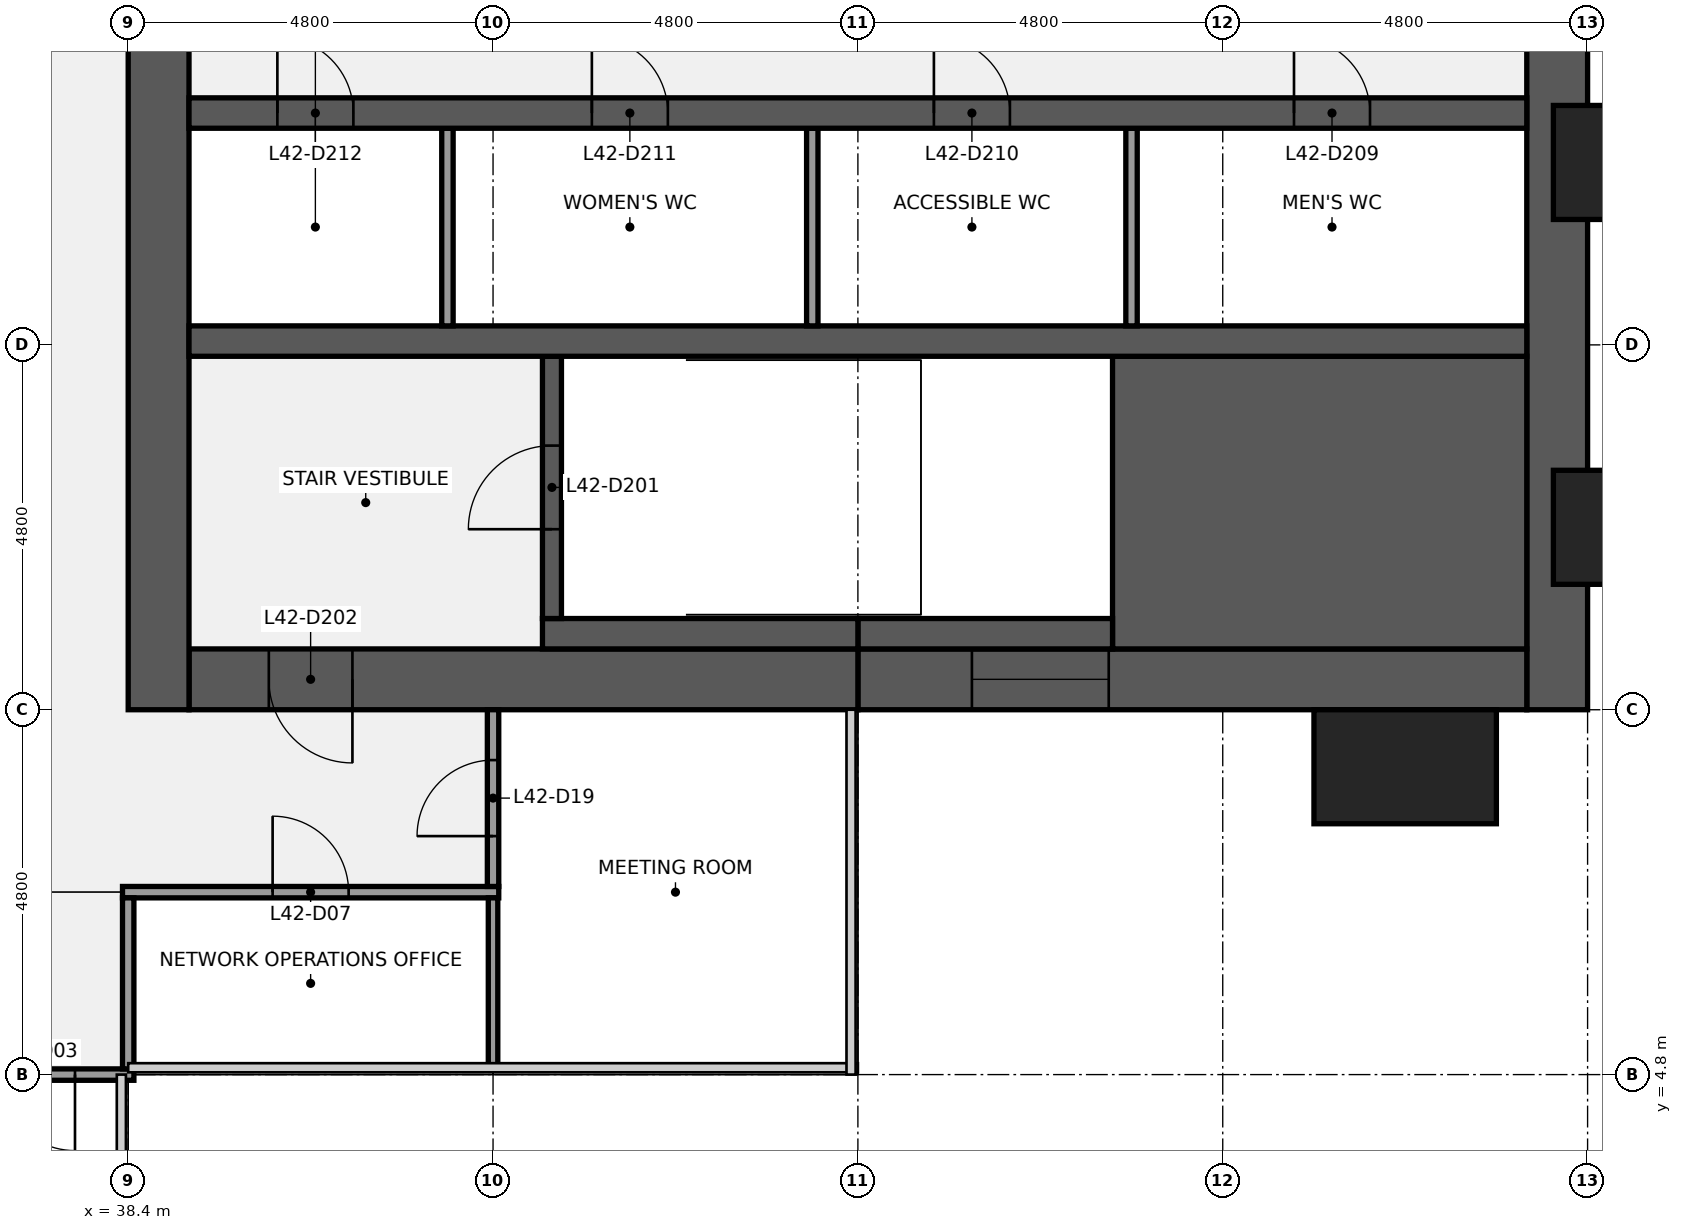
"""IFC4 building model, lengths in metres.
Left out: names, types, materials, properties, quantities, classifications, styles, units other than length and angle.
Written with IfcOpenShell. Run it as: python <this file> out.ifc"""

import sys

from ifc_helpers import new_model, si_unit, direction, frame, frame_2d, origin, origin_2d, place, context, subcontext, project, spatial, rectangle, extrude, element, fill, save


model = new_model("IFC4")
c1 = context("Model", 3, precision=1e-05, world=origin(), true_north=direction((0.0, 1.0)))
c2 = subcontext(c1, "Body", "Model", "MODEL_VIEW")
j1 = project(units=[si_unit("LENGTHUNIT", "METRE"), si_unit("PLANEANGLEUNIT", "RADIAN")], contexts=[c1])
p1 = place(None, origin())
s1 = spatial("IfcSite", under=j1, at=p1, CompositionType="ELEMENT")
p2 = place(p1, origin())
s2 = spatial("IfcBuilding", under=s1, at=p2, CompositionType="ELEMENT")
p3 = place(p2, frame((0.0, 0.0, 197.2)))
s3 = spatial("IfcBuildingStorey", under=s2, at=p3, CompositionType="ELEMENT", Elevation=197.2)
p4 = place(p3, frame((57.2, 38.4, 0.0), z_axis=(0.0, 0.0, 1.0), x_axis=(0.0, -1.0, 0.0)))
e1 = element("IfcWall", 1, at=p4, inside=s3, PredefinedType="SHEAR", context=c2, shape_type="SweptSolid", body=[
    extrude(rectangle(XDim=28.8, YDim=0.8, at=frame_2d((14.4, 0.0))), origin(), (0.0, 0.0, 1.0), 3.84),
])
p5 = place(p4, frame((18.45, 0.0, 0.9)))
e2 = element("IfcOpeningElement", 2, at=p5, cuts=e1, PredefinedType="OPENING", context=c2, shape_type="SweptSolid", body=[
    extrude(rectangle(XDim=1.5, YDim=1.5, at=frame_2d((0.75, 0.75))), frame((0.0, 0.41, 0.0), z_axis=(0.0, -1.0, 0.0), x_axis=(1.0, 0.0, 0.0)), (0.0, 0.0, 1.0), 0.82),
])
p6 = place(p4, frame((8.85, 0.0, 0.9)))
e3 = element("IfcOpeningElement", 3, at=p6, cuts=e1, PredefinedType="OPENING", context=c2, shape_type="SweptSolid", body=[
    extrude(rectangle(XDim=1.5, YDim=1.5, at=frame_2d((0.75, 0.75))), frame((0.0, 0.41, 0.0), z_axis=(0.0, -1.0, 0.0), x_axis=(1.0, 0.0, 0.0)), (0.0, 0.0, 1.0), 0.82),
])
p7 = place(p3, frame((56.8, 10.0, 0.0), z_axis=(0.0, 0.0, 1.0), x_axis=(-1.0, 0.0, 0.0)))
e4 = element("IfcWall", 4, at=p7, inside=s3, PredefinedType="SHEAR", context=c2, shape_type="SweptSolid", body=[
    extrude(rectangle(XDim=8.8, YDim=0.8, at=frame_2d((4.4, 0.0))), origin(), (0.0, 0.0, 1.0), 3.84),
])
p8 = place(p7, frame((5.5, 0.0, 0.9)))
e5 = element("IfcOpeningElement", 5, at=p8, cuts=e4, PredefinedType="OPENING", context=c2, shape_type="SweptSolid", body=[
    extrude(rectangle(XDim=1.8, YDim=1.5, at=frame_2d((0.9, 0.75))), frame((0.0, 0.41, 0.0), z_axis=(0.0, -1.0, 0.0), x_axis=(1.0, 0.0, 0.0)), (0.0, 0.0, 1.0), 0.82),
])
p9 = place(p3, frame((48.0, 10.0, 0.0), z_axis=(0.0, 0.0, 1.0), x_axis=(-1.0, 0.0, 0.0)))
e6 = element("IfcWall", 6, at=p9, inside=s3, PredefinedType="SHEAR", context=c2, shape_type="SweptSolid", body=[
    extrude(rectangle(XDim=8.8, YDim=0.8, at=frame_2d((4.4, 0.0))), origin(), (0.0, 0.0, 1.0), 3.84),
])
p10 = place(p9, frame((6.65, 0.0, 0.0)))
e7 = element("IfcOpeningElement", 7, at=p10, cuts=e6, PredefinedType="OPENING", context=c2, shape_type="SweptSolid", body=[
    extrude(rectangle(XDim=1.1, YDim=2.1, at=frame_2d((0.55, 1.05))), frame((0.0, 0.41, 0.0), z_axis=(0.0, -1.0, 0.0), x_axis=(1.0, 0.0, 0.0)), (0.0, 0.0, 1.0), 0.82),
])
p11 = place(p3, frame((38.8, 9.6, 0.0), z_axis=(0.0, 0.0, 1.0), x_axis=(0.0, 1.0, 0.0)))
e8 = element("IfcWall", 8, at=p11, inside=s3, PredefinedType="SHEAR", context=c2, shape_type="SweptSolid", body=[
    extrude(rectangle(XDim=28.8, YDim=0.8, at=frame_2d((14.4, 0.0))), origin(), (0.0, 0.0, 1.0), 3.84),
])
p12 = place(p11, frame((8.7, 0.0, 0.0)))
e9 = element("IfcOpeningElement", 9, at=p12, cuts=e8, PredefinedType="OPENING", context=c2, shape_type="SweptSolid", body=[
    extrude(rectangle(XDim=1.8, YDim=2.1, at=frame_2d((0.9, 1.05))), frame((0.0, 0.41, 0.0), z_axis=(0.0, -1.0, 0.0), x_axis=(1.0, 0.0, 0.0)), (0.0, 0.0, 1.0), 0.82),
])
p13 = place(p11, frame((18.3, 0.0, 0.0)))
e10 = element("IfcOpeningElement", 10, at=p13, cuts=e8, PredefinedType="OPENING", context=c2, shape_type="SweptSolid", body=[
    extrude(rectangle(XDim=1.8, YDim=2.1, at=frame_2d((0.9, 1.05))), frame((0.0, 0.41, 0.0), z_axis=(0.0, -1.0, 0.0), x_axis=(1.0, 0.0, 0.0)), (0.0, 0.0, 1.0), 0.82),
])
p14 = place(p3, frame((51.35, 12.325, 0.0), z_axis=(0.0, 0.0, 1.0), x_axis=(1.0, 0.0, 0.0)))
e11 = element("IfcWall", 11, at=p14, inside=s3, PredefinedType="SHEAR", context=c2, shape_type="SweptSolid", body=[
    extrude(rectangle(XDim=5.45, YDim=3.85, at=frame_2d((2.725, 0.0))), origin(), (0.0, 0.0, 1.0), 3.84),
])
p15 = place(p3, frame((48.0, 10.6, 0.0), z_axis=(0.0, 0.0, 1.0), x_axis=(1.0, 0.0, 0.0)))
e12 = element("IfcWall", 12, at=p15, inside=s3, PredefinedType="SHEAR", context=c2, shape_type="SweptSolid", body=[
    extrude(rectangle(XDim=3.35, YDim=0.4, at=frame_2d((1.675, 0.0))), origin(), (0.0, 0.0, 1.0), 3.84),
])
p16 = place(p3, frame((43.85, 10.6, 0.0), z_axis=(0.0, 0.0, 1.0), x_axis=(1.0, 0.0, 0.0)))
e13 = element("IfcWall", 13, at=p16, inside=s3, PredefinedType="SHEAR", context=c2, shape_type="SweptSolid", body=[
    extrude(rectangle(XDim=4.15, YDim=0.4, at=frame_2d((2.075, 0.0))), origin(), (0.0, 0.0, 1.0), 3.84),
])
p17 = place(p3, frame((43.975, 10.8, 0.0), z_axis=(0.0, 0.0, 1.0), x_axis=(0.0, 1.0, 0.0)))
e14 = element("IfcWall", 14, at=p17, inside=s3, PredefinedType="SHEAR", context=c2, shape_type="SweptSolid", body=[
    extrude(rectangle(XDim=3.45, YDim=0.25, at=frame_2d((1.725, 0.0))), origin(), (0.0, 0.0, 1.0), 3.84),
])
p18 = place(p17, frame((1.175, 0.0, 0.0)))
e15 = element("IfcOpeningElement", 15, at=p18, cuts=e14, PredefinedType="OPENING", context=c2, shape_type="SweptSolid", body=[
    extrude(rectangle(XDim=1.1, YDim=2.1, at=frame_2d((0.55, 1.05))), frame((0.0, 0.135, 0.0), z_axis=(0.0, -1.0, 0.0), x_axis=(1.0, 0.0, 0.0)), (0.0, 0.0, 1.0), 0.27),
])
p19 = place(p3, frame((39.2, 14.45, 0.0), z_axis=(0.0, 0.0, 1.0), x_axis=(1.0, 0.0, 0.0)))
e16 = element("IfcWall", 16, at=p19, inside=s3, PredefinedType="SHEAR", context=c2, shape_type="SweptSolid", body=[
    extrude(rectangle(XDim=17.6, YDim=0.4, at=frame_2d((8.8, 0.0))), origin(), (0.0, 0.0, 1.0), 3.84),
])
for number, where, z_axis, x_axis in (
    (17, (51.6, 14.65, 0.0), (0.0, 0.0, 1.0), (0.0, 1.0, 0.0)),
    (18, (47.4, 14.65, 0.0), (0.0, 0.0, 1.0), (0.0, 1.0, 0.0)),
    (19, (42.6, 14.65, 0.0), (0.0, 0.0, 1.0), (0.0, 1.0, 0.0)),
):
    element("IfcWall", number, at=place(p3, frame(where, z_axis=z_axis, x_axis=x_axis)), inside=s3, PredefinedType="PARTITIONING", context=c2, shape_type="SweptSolid", body=[
        extrude(rectangle(XDim=2.6, YDim=0.15, at=frame_2d((1.3, 0.0))), origin(), (0.0, 0.0, 1.0), 3.84),
    ])
p20 = place(p3, frame((39.2, 17.45, 0.0), z_axis=(0.0, 0.0, 1.0), x_axis=(1.0, 0.0, 0.0)))
e20 = element("IfcWall", 20, at=p20, inside=s3, PredefinedType="SHEAR", context=c2, shape_type="SweptSolid", body=[
    extrude(rectangle(XDim=17.6, YDim=0.4, at=frame_2d((8.8, 0.0))), origin(), (0.0, 0.0, 1.0), 3.84),
])
p21 = place(p20, frame((14.538, 0.0, 0.0)))
e21 = element("IfcOpeningElement", 21, at=p21, cuts=e20, PredefinedType="OPENING", context=c2, shape_type="SweptSolid", body=[
    extrude(rectangle(XDim=1.0, YDim=2.1, at=frame_2d((0.5, 1.05))), frame((0.0, 0.21, 0.0), z_axis=(0.0, -1.0, 0.0), x_axis=(1.0, 0.0, 0.0)), (0.0, 0.0, 1.0), 0.42),
])
p22 = place(p20, frame((9.8, 0.0, 0.0)))
e22 = element("IfcOpeningElement", 22, at=p22, cuts=e20, PredefinedType="OPENING", context=c2, shape_type="SweptSolid", body=[
    extrude(rectangle(XDim=1.0, YDim=2.1, at=frame_2d((0.5, 1.05))), frame((0.0, 0.21, 0.0), z_axis=(0.0, -1.0, 0.0), x_axis=(1.0, 0.0, 0.0)), (0.0, 0.0, 1.0), 0.42),
])
p23 = place(p20, frame((5.3, 0.0, 0.0)))
e23 = element("IfcOpeningElement", 23, at=p23, cuts=e20, PredefinedType="OPENING", context=c2, shape_type="SweptSolid", body=[
    extrude(rectangle(XDim=1.0, YDim=2.1, at=frame_2d((0.5, 1.05))), frame((0.0, 0.21, 0.0), z_axis=(0.0, -1.0, 0.0), x_axis=(1.0, 0.0, 0.0)), (0.0, 0.0, 1.0), 0.42),
])
p24 = place(p20, frame((1.163, 0.0, 0.0)))
e24 = element("IfcOpeningElement", 24, at=p24, cuts=e20, PredefinedType="OPENING", context=c2, shape_type="SweptSolid", body=[
    extrude(rectangle(XDim=1.0, YDim=2.1, at=frame_2d((0.5, 1.05))), frame((0.0, 0.21, 0.0), z_axis=(0.0, -1.0, 0.0), x_axis=(1.0, 0.0, 0.0)), (0.0, 0.0, 1.0), 0.42),
])
p25 = place(p3, frame((19.125, 4.8, 0.0), z_axis=(0.0, 0.0, 1.0), x_axis=(1.0, 0.0, 0.0)))
e25 = element("IfcWall", 25, at=p25, inside=s3, PredefinedType="PARTITIONING", context=c2, shape_type="SweptSolid", body=[
    extrude(rectangle(XDim=19.35, YDim=0.15, at=frame_2d((9.675, 0.0))), origin(), (0.0, 0.0, 1.0), 2.87),
])
p26 = place(p25, frame((5.575, 0.0, 0.0)))
e26 = element("IfcOpeningElement", 26, at=p26, cuts=e25, PredefinedType="OPENING", context=c2, shape_type="SweptSolid", body=[
    extrude(rectangle(XDim=1.0, YDim=2.1, at=frame_2d((0.5, 1.05))), frame((0.0, 0.085, 0.0), z_axis=(0.0, -1.0, 0.0), x_axis=(1.0, 0.0, 0.0)), (0.0, 0.0, 1.0), 0.17),
])
p27 = place(p25, frame((13.975, 0.0, 0.0)))
e27 = element("IfcOpeningElement", 27, at=p27, cuts=e25, PredefinedType="OPENING", context=c2, shape_type="SweptSolid", body=[
    extrude(rectangle(XDim=1.0, YDim=2.1, at=frame_2d((0.5, 1.05))), frame((0.0, 0.085, 0.0), z_axis=(0.0, -1.0, 0.0), x_axis=(1.0, 0.0, 0.0)), (0.0, 0.0, 1.0), 0.17),
])
p28 = place(p25, frame((17.575, 0.0, 0.0)))
e28 = element("IfcOpeningElement", 28, at=p28, cuts=e25, PredefinedType="OPENING", context=c2, shape_type="SweptSolid", body=[
    extrude(rectangle(XDim=1.0, YDim=2.1, at=frame_2d((0.5, 1.05))), frame((0.0, 0.085, 0.0), z_axis=(0.0, -1.0, 0.0), x_axis=(1.0, 0.0, 0.0)), (0.0, 0.0, 1.0), 0.17),
])
p29 = place(p3, frame((38.325, 7.2, 0.0), z_axis=(0.0, 0.0, 1.0), x_axis=(1.0, 0.0, 0.0)))
e29 = element("IfcWall", 29, at=p29, inside=s3, PredefinedType="PARTITIONING", context=c2, shape_type="SweptSolid", body=[
    extrude(rectangle(XDim=4.95, YDim=0.15, at=frame_2d((2.475, 0.0))), origin(), (0.0, 0.0, 1.0), 2.87),
])
p30 = place(p29, frame((1.975, 0.0, 0.0)))
e30 = element("IfcOpeningElement", 30, at=p30, cuts=e29, PredefinedType="OPENING", context=c2, shape_type="SweptSolid", body=[
    extrude(rectangle(XDim=1.0, YDim=2.1, at=frame_2d((0.5, 1.05))), frame((0.0, 0.085, 0.0), z_axis=(0.0, -1.0, 0.0), x_axis=(1.0, 0.0, 0.0)), (0.0, 0.0, 1.0), 0.17),
])
p31 = place(p3, frame((38.4, 4.875, 0.0), z_axis=(0.0, 0.0, 1.0), x_axis=(0.0, 1.0, 0.0)))
e31 = element("IfcWall", 31, at=p31, inside=s3, PredefinedType="PARTITIONING", context=c2, shape_type="SweptSolid", body=[
    extrude(rectangle(XDim=2.25, YDim=0.15, at=frame_2d((1.125, 0.0))), origin(), (0.0, 0.0, 1.0), 2.87),
])
p32 = place(p3, frame((43.2, 4.9, 0.0), z_axis=(0.0, 0.0, 1.0), x_axis=(0.0, 1.0, 0.0)))
e32 = element("IfcWall", 32, at=p32, inside=s3, PredefinedType="PARTITIONING", context=c2, shape_type="SweptSolid", body=[
    extrude(rectangle(XDim=2.225, YDim=0.125, at=frame_2d((1.113, 0.0))), origin(), (0.0, 0.0, 1.0), 2.87),
])
p33 = place(p3, frame((43.2, 7.275, 0.0), z_axis=(0.0, 0.0, 1.0), x_axis=(0.0, 1.0, 0.0)))
e33 = element("IfcWall", 33, at=p33, inside=s3, PredefinedType="PARTITIONING", context=c2, shape_type="SweptSolid", body=[
    extrude(rectangle(XDim=2.325, YDim=0.15, at=frame_2d((1.163, 0.0))), origin(), (0.0, 0.0, 1.0), 2.87),
])
p34 = place(p33, frame((0.663, 0.0, 0.0)))
e34 = element("IfcOpeningElement", 34, at=p34, cuts=e33, PredefinedType="OPENING", context=c2, shape_type="SweptSolid", body=[
    extrude(rectangle(XDim=1.0, YDim=2.1, at=frame_2d((0.5, 1.05))), frame((0.0, 0.085, 0.0), z_axis=(0.0, -1.0, 0.0), x_axis=(1.0, 0.0, 0.0)), (0.0, 0.0, 1.0), 0.17),
])
for number, where, z_axis, x_axis in (
    (35, (55.2, 8.85, 0.0), (0.0, 0.0, 1.0), (1.0, 0.0, 0.0)),
    (36, (58.35, 12.0, 0.0), (0.0, 0.0, 1.0), (0.0, 1.0, 0.0)),
    (37, (58.35, 16.8, 0.0), (0.0, 0.0, 1.0), (0.0, 1.0, 0.0)),
):
    element("IfcColumn", number, at=place(p3, frame(where, z_axis=z_axis, x_axis=x_axis)), inside=s3, PredefinedType="PILASTER", context=c2, shape_type="SweptSolid", body=[
        extrude(rectangle(XDim=2.4, YDim=1.5, at=origin_2d()), origin(), (0.0, 0.0, 1.0), 4.0),
    ])
p35 = place(p18, origin())
e38 = element("IfcDoor", 38, at=p35, inside=s3, OperationType="SINGLE_SWING_LEFT", PredefinedType="DOOR", context=c2, shape_type="SweptSolid", body=[
    extrude(rectangle(XDim=1.1, YDim=2.1, at=frame_2d((0.55, 1.05))), frame((0.0, 0.025, 0.0), z_axis=(0.0, -1.0, 0.0), x_axis=(1.0, 0.0, 0.0)), (0.0, 0.0, 1.0), 0.05),
])
fill(e15, e38)
p36 = place(p10, origin())
e39 = element("IfcDoor", 39, at=p36, inside=s3, OperationType="SINGLE_SWING_LEFT", PredefinedType="DOOR", context=c2, shape_type="SweptSolid", body=[
    extrude(rectangle(XDim=1.1, YDim=2.1, at=frame_2d((0.55, 1.05))), frame((0.0, 0.025, 0.0), z_axis=(0.0, -1.0, 0.0), x_axis=(1.0, 0.0, 0.0)), (0.0, 0.0, 1.0), 0.05),
])
fill(e7, e39)
p37 = place(p21, origin())
e40 = element("IfcDoor", 40, at=p37, inside=s3, OperationType="SINGLE_SWING_LEFT", PredefinedType="DOOR", context=c2, shape_type="SweptSolid", body=[
    extrude(rectangle(XDim=1.0, YDim=2.1, at=frame_2d((0.5, 1.05))), frame((0.0, 0.025, 0.0), z_axis=(0.0, -1.0, 0.0), x_axis=(1.0, 0.0, 0.0)), (0.0, 0.0, 1.0), 0.05),
])
fill(e21, e40)
p38 = place(p22, origin())
e41 = element("IfcDoor", 41, at=p38, inside=s3, OperationType="SINGLE_SWING_LEFT", PredefinedType="DOOR", context=c2, shape_type="SweptSolid", body=[
    extrude(rectangle(XDim=1.0, YDim=2.1, at=frame_2d((0.5, 1.05))), frame((0.0, 0.025, 0.0), z_axis=(0.0, -1.0, 0.0), x_axis=(1.0, 0.0, 0.0)), (0.0, 0.0, 1.0), 0.05),
])
fill(e22, e41)
p39 = place(p23, origin())
e42 = element("IfcDoor", 42, at=p39, inside=s3, OperationType="SINGLE_SWING_LEFT", PredefinedType="DOOR", context=c2, shape_type="SweptSolid", body=[
    extrude(rectangle(XDim=1.0, YDim=2.1, at=frame_2d((0.5, 1.05))), frame((0.0, 0.025, 0.0), z_axis=(0.0, -1.0, 0.0), x_axis=(1.0, 0.0, 0.0)), (0.0, 0.0, 1.0), 0.05),
])
fill(e23, e42)
p40 = place(p24, origin())
e43 = element("IfcDoor", 43, at=p40, inside=s3, OperationType="SINGLE_SWING_LEFT", PredefinedType="DOOR", context=c2, shape_type="SweptSolid", body=[
    extrude(rectangle(XDim=1.0, YDim=2.1, at=frame_2d((0.5, 1.05))), frame((0.0, 0.025, 0.0), z_axis=(0.0, -1.0, 0.0), x_axis=(1.0, 0.0, 0.0)), (0.0, 0.0, 1.0), 0.05),
])
fill(e24, e43)
p41 = place(p8, origin())
e44 = element("IfcWindow", 44, at=p41, inside=s3, PartitioningType="SINGLE_PANEL", PredefinedType="WINDOW", context=c2, shape_type="SweptSolid", body=[
    extrude(rectangle(XDim=1.8, YDim=1.5, at=frame_2d((0.9, 0.75))), frame((0.0, 0.03, 0.0), z_axis=(0.0, -1.0, 0.0), x_axis=(1.0, 0.0, 0.0)), (0.0, 0.0, 1.0), 0.06),
])
fill(e5, e44)
p42 = place(p28, origin())
e45 = element("IfcDoor", 45, at=p42, inside=s3, OperationType="SINGLE_SWING_RIGHT", PredefinedType="DOOR", context=c2, shape_type="SweptSolid", body=[
    extrude(rectangle(XDim=1.0, YDim=2.1, at=frame_2d((0.5, 1.05))), frame((0.0, 0.025, 0.0), z_axis=(0.0, -1.0, 0.0), x_axis=(1.0, 0.0, 0.0)), (0.0, 0.0, 1.0), 0.05),
])
fill(e28, e45)
p43 = place(p30, origin())
e46 = element("IfcDoor", 46, at=p43, inside=s3, OperationType="SINGLE_SWING_LEFT", PredefinedType="DOOR", context=c2, shape_type="SweptSolid", body=[
    extrude(rectangle(XDim=1.0, YDim=2.1, at=frame_2d((0.5, 1.05))), frame((0.0, 0.025, 0.0), z_axis=(0.0, -1.0, 0.0), x_axis=(1.0, 0.0, 0.0)), (0.0, 0.0, 1.0), 0.05),
])
fill(e30, e46)
p44 = place(p34, origin())
e47 = element("IfcDoor", 47, at=p44, inside=s3, OperationType="SINGLE_SWING_LEFT", PredefinedType="DOOR", context=c2, shape_type="SweptSolid", body=[
    extrude(rectangle(XDim=1.0, YDim=2.1, at=frame_2d((0.5, 1.05))), frame((0.0, 0.025, 0.0), z_axis=(0.0, -1.0, 0.0), x_axis=(1.0, 0.0, 0.0)), (0.0, 0.0, 1.0), 0.05),
])
fill(e34, e47)
save(model, sys.argv[1])
